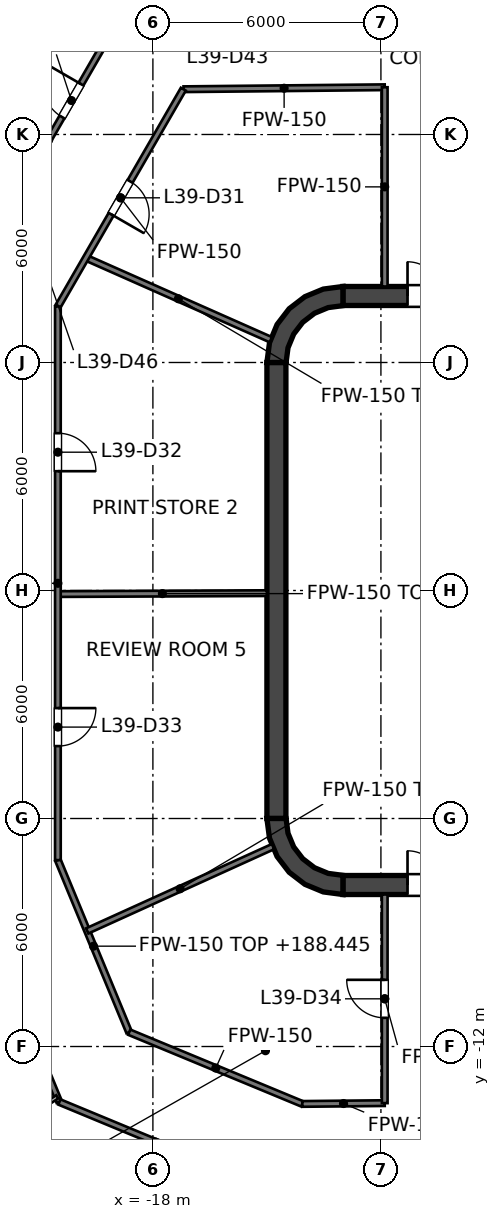
"""IFC4 building model, lengths in metres.
Left out: names, types, materials, properties, quantities, classifications, styles, units other than length and angle.
Written with IfcOpenShell. Run it as: python <this file> out.ifc"""

import sys

from ifc_helpers import new_model, si_unit, direction, frame, frame_2d, origin, place, context, subcontext, project, spatial, polyline, rectangle, outline, extrude, element, fill, save


model = new_model("IFC4")
c1 = context("Model", 3, precision=1e-05, world=origin(), true_north=direction((0.0, 1.0)))
c2 = subcontext(c1, "Body", "Model", "MODEL_VIEW")
j1 = project(units=[si_unit("LENGTHUNIT", "METRE"), si_unit("PLANEANGLEUNIT", "RADIAN")], contexts=[c1])
p1 = place(None, origin())
s1 = spatial("IfcSite", under=j1, at=p1, CompositionType="ELEMENT")
p2 = place(p1, origin())
s2 = spatial("IfcBuilding", under=s1, at=p2, CompositionType="ELEMENT")
p3 = place(p2, frame((0.0, 0.0, 185.6)))
s3 = spatial("IfcBuildingStorey", under=s2, at=p3, CompositionType="ELEMENT", Elevation=185.6)
p4 = place(p3, frame((-13.0, 7.75, 0.0), z_axis=(0.0, 0.0, 1.0), x_axis=(1.0, 0.0, 0.0)))
e1 = element("IfcWall", 1, at=p4, inside=s3, PredefinedType="SHEAR", context=c2, shape_type="SweptSolid", body=[
    extrude(rectangle(XDim=26.0, YDim=0.5, at=frame_2d((13.0, 0.0))), origin(), (0.0, 0.0, 1.0), 4.0),
])
p5 = place(p4, frame((1.7, 0.0, 0.0)))
e2 = element("IfcOpeningElement", 2, at=p5, cuts=e1, PredefinedType="OPENING", context=c2, shape_type="SweptSolid", body=[
    extrude(rectangle(XDim=1.8, YDim=2.1, at=frame_2d((0.9, 1.05))), frame((0.0, 0.25, 0.0), z_axis=(0.0, -1.0, 0.0), x_axis=(1.0, 0.0, 0.0)), (0.0, 0.0, 1.0), 0.5),
])
p6 = place(p4, frame((22.5, 0.0, 0.0)))
e3 = element("IfcOpeningElement", 3, at=p6, cuts=e1, PredefinedType="OPENING", context=c2, shape_type="SweptSolid", body=[
    extrude(rectangle(XDim=1.8, YDim=2.1, at=frame_2d((0.9, 1.05))), frame((0.0, 0.25, 0.0), z_axis=(0.0, -1.0, 0.0), x_axis=(1.0, 0.0, 0.0)), (0.0, 0.0, 1.0), 0.5),
])
p7 = place(p3, frame((-13.0, -7.75, 0.0), z_axis=(0.0, 0.0, 1.0), x_axis=(1.0, 0.0, 0.0)))
e4 = element("IfcWall", 4, at=p7, inside=s3, PredefinedType="SHEAR", context=c2, shape_type="SweptSolid", body=[
    extrude(rectangle(XDim=26.0, YDim=0.5, at=frame_2d((13.0, 0.0))), origin(), (0.0, 0.0, 1.0), 4.0),
])
p8 = place(p7, frame((1.7, 0.0, 0.0)))
e5 = element("IfcOpeningElement", 5, at=p8, cuts=e4, PredefinedType="OPENING", context=c2, shape_type="SweptSolid", body=[
    extrude(rectangle(XDim=1.8, YDim=2.1, at=frame_2d((0.9, 1.05))), frame((0.0, 0.25, 0.0), z_axis=(0.0, -1.0, 0.0), x_axis=(1.0, 0.0, 0.0)), (0.0, 0.0, 1.0), 0.5),
])
p9 = place(p7, frame((22.5, 0.0, 0.0)))
e6 = element("IfcOpeningElement", 6, at=p9, cuts=e4, PredefinedType="OPENING", context=c2, shape_type="SweptSolid", body=[
    extrude(rectangle(XDim=1.8, YDim=2.1, at=frame_2d((0.9, 1.05))), frame((0.0, 0.25, 0.0), z_axis=(0.0, -1.0, 0.0), x_axis=(1.0, 0.0, 0.0)), (0.0, 0.0, 1.0), 0.5),
])
p10 = place(p3, frame((-14.75, -6.0, 0.0), z_axis=(0.0, 0.0, 1.0), x_axis=(0.0, 1.0, 0.0)))
e7 = element("IfcWall", 7, at=p10, inside=s3, PredefinedType="SHEAR", context=c2, shape_type="SweptSolid", body=[
    extrude(rectangle(XDim=12.0, YDim=0.5, at=frame_2d((6.0, 0.0))), origin(), (0.0, 0.0, 1.0), 4.0),
])
p11 = place(p3, origin())
e8 = element("IfcWall", 8, at=p11, inside=s3, PredefinedType="SHEAR", context=c2, shape_type="SweptSolid", body=[
    extrude(outline(polyline([(-15.0, 6.0), (-14.496, 6.0), (-14.445, 6.387), (-14.295, 6.748), (-14.058, 7.058), (-13.748, 7.295), (-13.387, 7.445), (-13.0, 7.496), (-13.0, 8.0), (-13.518, 7.932), (-14.0, 7.732), (-14.414, 7.414), (-14.732, 7.0), (-14.932, 6.518), (-15.0, 6.0)])), origin(), (0.0, 0.0, 1.0), 4.0),
])
e9 = element("IfcWall", 9, at=p11, inside=s3, PredefinedType="SHEAR", context=c2, shape_type="SweptSolid", body=[
    extrude(outline(polyline([(-13.0, -8.0), (-13.0, -7.496), (-13.387, -7.445), (-13.748, -7.295), (-14.058, -7.058), (-14.295, -6.748), (-14.445, -6.387), (-14.496, -6.0), (-15.0, -6.0), (-14.932, -6.518), (-14.732, -7.0), (-14.414, -7.414), (-14.0, -7.732), (-13.518, -7.932), (-13.0, -8.0)])), origin(), (0.0, 0.0, 1.0), 4.0),
])
p12 = place(p3, frame((-11.8, -7.5, 0.0), z_axis=(0.0, 0.0, 1.0), x_axis=(0.0, 1.0, 0.0)))
e10 = element("IfcWall", 10, at=p12, inside=s3, PredefinedType="SOLIDWALL", context=c2, shape_type="SweptSolid", body=[
    extrude(rectangle(XDim=15.0, YDim=0.4, at=frame_2d((7.5, 0.0))), origin(), (0.0, 0.0, 1.0), 3.85),
])
p13 = place(p12, frame((11.3, 0.0, 0.0)))
e11 = element("IfcOpeningElement", 11, at=p13, cuts=e10, PredefinedType="OPENING", context=c2, shape_type="SweptSolid", body=[
    extrude(rectangle(XDim=1.1, YDim=2.1, at=frame_2d((0.55, 1.05))), frame((0.0, 0.2, 0.0), z_axis=(0.0, -1.0, 0.0), x_axis=(1.0, 0.0, 0.0)), (0.0, 0.0, 1.0), 0.4),
])
p14 = place(p12, frame((8.4, 0.0, 0.0)))
e12 = element("IfcOpeningElement", 12, at=p14, cuts=e10, PredefinedType="OPENING", context=c2, shape_type="SweptSolid", body=[
    extrude(rectangle(XDim=1.1, YDim=2.1, at=frame_2d((0.55, 1.05))), frame((0.0, 0.2, 0.0), z_axis=(0.0, -1.0, 0.0), x_axis=(1.0, 0.0, 0.0)), (0.0, 0.0, 1.0), 0.4),
])
p15 = place(p12, frame((5.5, 0.0, 0.0)))
e13 = element("IfcOpeningElement", 13, at=p15, cuts=e10, PredefinedType="OPENING", context=c2, shape_type="SweptSolid", body=[
    extrude(rectangle(XDim=1.1, YDim=2.1, at=frame_2d((0.55, 1.05))), frame((0.0, 0.2, 0.0), z_axis=(0.0, -1.0, 0.0), x_axis=(1.0, 0.0, 0.0)), (0.0, 0.0, 1.0), 0.4),
])
p16 = place(p12, frame((13.697, 0.0, 0.0)))
e14 = element("IfcOpeningElement", 14, at=p16, cuts=e10, PredefinedType="OPENING", context=c2, shape_type="SweptSolid", body=[
    extrude(rectangle(XDim=0.9, YDim=2.1, at=frame_2d((0.45, 1.05))), frame((0.0, 0.2, 0.0), z_axis=(0.0, -1.0, 0.0), x_axis=(1.0, 0.0, 0.0)), (0.0, 0.0, 1.0), 0.4),
])
p17 = place(p12, frame((0.403, 0.0, 0.0)))
e15 = element("IfcOpeningElement", 15, at=p17, cuts=e10, PredefinedType="OPENING", context=c2, shape_type="SweptSolid", body=[
    extrude(rectangle(XDim=0.9, YDim=2.1, at=frame_2d((0.45, 1.05))), frame((0.0, 0.2, 0.0), z_axis=(0.0, -1.0, 0.0), x_axis=(1.0, 0.0, 0.0)), (0.0, 0.0, 1.0), 0.4),
])
e16 = element("IfcWall", 16, at=p11, inside=s3, PredefinedType="SOLIDWALL", context=c2, shape_type="SweptSolid", body=[
    extrude(outline(polyline([(-12.0, -5.925), (-12.0, -5.675), (-14.25, -5.675), (-14.25, -3.025), (-12.0, -3.025), (-12.0, -2.775), (-14.25, -2.775), (-14.25, -0.125), (-12.0, -0.125), (-12.0, 0.125), (-14.25, 0.125), (-14.25, 2.775), (-12.0, 2.775), (-12.0, 3.025), (-14.25, 3.025), (-14.25, 5.675), (-12.0, 5.675), (-12.0, 5.925), (-14.25, 5.925), (-14.5, 5.925), (-14.5, 5.675), (-14.5, 3.025), (-14.5, 2.775), (-14.5, 0.125), (-14.5, -0.125), (-14.5, -2.775), (-14.5, -3.025), (-14.5, -5.675), (-14.5, -5.925), (-14.25, -5.925), (-12.0, -5.925)])), origin(), (0.0, 0.0, 1.0), 3.85),
])
p18 = place(p3, frame((-22.9, -7.572, 0.0), z_axis=(0.0, 0.0, 1.0), x_axis=(0.382367581622, -0.924010298928, 0.0)))
e17 = element("IfcWall", 17, at=p18, inside=s3, PredefinedType="PARTITIONING", context=c2, shape_type="SweptSolid", body=[
    extrude(rectangle(XDim=6.374, YDim=0.15, at=frame_2d((3.187, 0.0))), origin(), (0.0, 0.0, 1.0), 2.777),
])
p19 = place(p18, frame((2.6, 0.0, 0.0)))
e18 = element("IfcOpeningElement", 18, at=p19, cuts=e17, PredefinedType="OPENING", context=c2, shape_type="SweptSolid", body=[
    extrude(rectangle(XDim=1.0, YDim=2.1, at=frame_2d((0.5, 1.05))), frame((0.0, 0.075, 0.0), z_axis=(0.0, -1.0, 0.0), x_axis=(1.0, 0.0, 0.0)), (0.0, 0.0, 1.0), 0.15),
])
p20 = place(p3, frame((-20.5, -7.095, 0.0), z_axis=(0.0, 0.0, 1.0), x_axis=(0.382364990163, -0.924011371303, 0.0)))
e19 = element("IfcWall", 19, at=p20, inside=s3, PredefinedType="PARTITIONING", context=c2, shape_type="SweptSolid", body=[
    extrude(rectangle(XDim=4.902, YDim=0.15, at=frame_2d((2.451, 0.0))), origin(), (0.0, 0.0, 1.0), 2.845),
])
p21 = place(p3, frame((-24.433, 14.106, 0.0), z_axis=(0.0, 0.0, 1.0), x_axis=(0.866048255864, -0.499960416948, 0.0)))
e20 = element("IfcWall", 20, at=p21, inside=s3, PredefinedType="PARTITIONING", context=c2, shape_type="SweptSolid", body=[
    extrude(rectangle(XDim=4.322, YDim=0.15, at=frame_2d((2.161, 0.0))), origin(), (0.0, 0.0, 1.0), 2.845),
])
p22 = place(p3, frame((-19.76, 8.755, 0.0), z_axis=(0.0, 0.0, 1.0), x_axis=(0.91424834547, -0.405154245695, 0.0)))
e21 = element("IfcWall", 21, at=p22, inside=s3, PredefinedType="PARTITIONING", context=c2, shape_type="SweptSolid", body=[
    extrude(rectangle(XDim=5.318, YDim=0.15, at=frame_2d((2.659, 0.0))), origin(), (0.0, 0.0, 1.0), 2.845),
])
p23 = place(p3, frame((-20.46, -13.46, 0.0), z_axis=(0.0, 0.0, 1.0), x_axis=(0.923801547606, -0.382871650349, 0.0)))
e22 = element("IfcWall", 22, at=p23, inside=s3, PredefinedType="PARTITIONING", context=c2, shape_type="SweptSolid", body=[
    extrude(rectangle(XDim=6.415, YDim=0.15, at=frame_2d((3.208, 0.0))), origin(), (0.0, 0.0, 1.0), 2.777),
])
p24 = place(p23, frame((2.707, 0.0, 0.0)))
e23 = element("IfcOpeningElement", 23, at=p24, cuts=e22, PredefinedType="OPENING", context=c2, shape_type="SweptSolid", body=[
    extrude(rectangle(XDim=1.0, YDim=2.1, at=frame_2d((0.5, 1.05))), frame((0.0, 0.075, 0.0), z_axis=(0.0, -1.0, 0.0), x_axis=(1.0, 0.0, 0.0)), (0.0, 0.0, 1.0), 0.15),
])
p25 = place(p3, frame((-18.623, -11.623, 0.0), z_axis=(0.0, 0.0, 1.0), x_axis=(0.923791670587, -0.38289548098, 0.0)))
e24 = element("IfcWall", 24, at=p25, inside=s3, PredefinedType="PARTITIONING", context=c2, shape_type="SweptSolid", body=[
    extrude(rectangle(XDim=4.931, YDim=0.15, at=frame_2d((2.465, 0.0))), origin(), (0.0, 0.0, 1.0), 2.777),
])
p26 = place(p3, frame((-20.5, -0.094, 0.0), z_axis=(0.0, 0.0, 1.0), x_axis=(0.999990148138, 0.004438876723, 0.0)))
e25 = element("IfcWall", 25, at=p26, inside=s3, PredefinedType="PARTITIONING", context=c2, shape_type="SweptSolid", body=[
    extrude(rectangle(XDim=5.5, YDim=0.15, at=frame_2d((2.75, 0.0))), origin(), (0.0, 0.0, 1.0), 2.768),
])
p27 = place(p3, frame((-14.068, -13.511, 0.0), z_axis=(0.0, 0.0, 1.0), x_axis=(0.999950911515, 0.009908307647, 0.0)))
e26 = element("IfcWall", 26, at=p27, inside=s3, PredefinedType="PARTITIONING", context=c2, shape_type="SweptSolid", body=[
    extrude(rectangle(XDim=2.168, YDim=0.15, at=frame_2d((1.084, 0.0))), origin(), (0.0, 0.0, 1.0), 2.777),
])
p28 = place(p3, frame((-17.194, 13.191, 0.0), z_axis=(0.0, 0.0, 1.0), x_axis=(0.999950853109, 0.009914200296, 0.0)))
e27 = element("IfcWall", 27, at=p28, inside=s3, PredefinedType="PARTITIONING", context=c2, shape_type="SweptSolid", body=[
    extrude(rectangle(XDim=5.294, YDim=0.15, at=frame_2d((2.647, 0.0))), origin(), (0.0, 0.0, 1.0), 2.777),
])
p29 = place(p3, frame((-19.728, -8.958, 0.0), z_axis=(0.0, 0.0, 1.0), x_axis=(0.910629511797, 0.413223779863, 0.0)))
e28 = element("IfcWall", 28, at=p29, inside=s3, PredefinedType="PARTITIONING", context=c2, shape_type="SweptSolid", body=[
    extrude(rectangle(XDim=5.368, YDim=0.15, at=frame_2d((2.684, 0.0))), origin(), (0.0, 0.0, 1.0), 3.7),
])
p30 = place(p3, frame((-20.5, 7.474, 0.0), z_axis=(0.0, 0.0, 1.0), x_axis=(0.499957196903, 0.866050114754, 0.0)))
e29 = element("IfcWall", 29, at=p30, inside=s3, PredefinedType="PARTITIONING", context=c2, shape_type="SweptSolid", body=[
    extrude(rectangle(XDim=6.602, YDim=0.15, at=frame_2d((3.301, 0.0))), origin(), (0.0, 0.0, 1.0), 2.777),
])
p31 = place(p30, frame((2.802, 0.0, 0.0)))
e30 = element("IfcOpeningElement", 30, at=p31, cuts=e29, PredefinedType="OPENING", context=c2, shape_type="SweptSolid", body=[
    extrude(rectangle(XDim=1.0, YDim=2.1, at=frame_2d((0.5, 1.05))), frame((0.0, 0.075, 0.0), z_axis=(0.0, -1.0, 0.0), x_axis=(1.0, 0.0, 0.0)), (0.0, 0.0, 1.0), 0.15),
])
p32 = place(p3, frame((-22.9, 8.117, 0.0), z_axis=(0.0, 0.0, 1.0), x_axis=(0.499950307977, 0.866054091587, 0.0)))
e31 = element("IfcWall", 31, at=p32, inside=s3, PredefinedType="PARTITIONING", context=c2, shape_type="SweptSolid", body=[
    extrude(rectangle(XDim=8.626, YDim=0.15, at=frame_2d((4.313, 0.0))), origin(), (0.0, 0.0, 1.0), 2.777),
])
p33 = place(p32, frame((5.015, 0.0, 0.0)))
e32 = element("IfcOpeningElement", 32, at=p33, cuts=e31, PredefinedType="OPENING", context=c2, shape_type="SweptSolid", body=[
    extrude(rectangle(XDim=1.0, YDim=2.1, at=frame_2d((0.5, 1.05))), frame((0.0, 0.075, 0.0), z_axis=(0.0, -1.0, 0.0), x_axis=(1.0, 0.0, 0.0)), (0.0, 0.0, 1.0), 0.15),
])
p34 = place(p32, frame((2.237, 0.0, 0.0)))
e33 = element("IfcOpeningElement", 33, at=p34, cuts=e31, PredefinedType="OPENING", context=c2, shape_type="SweptSolid", body=[
    extrude(rectangle(XDim=1.0, YDim=2.1, at=frame_2d((0.5, 1.05))), frame((0.0, 0.075, 0.0), z_axis=(0.0, -1.0, 0.0), x_axis=(1.0, 0.0, 0.0)), (0.0, 0.0, 1.0), 0.15),
])
p35 = place(p3, frame((-11.9, -13.49, 0.0), z_axis=(0.0, 0.0, 1.0), x_axis=(0.0, 1.0, 0.0)))
e34 = element("IfcWall", 34, at=p35, inside=s3, PredefinedType="PARTITIONING", context=c2, shape_type="SweptSolid", body=[
    extrude(rectangle(XDim=5.49, YDim=0.15, at=frame_2d((2.745, 0.0))), origin(), (0.0, 0.0, 1.0), 2.777),
])
p36 = place(p35, frame((2.245, 0.0, 0.0)))
e35 = element("IfcOpeningElement", 35, at=p36, cuts=e34, PredefinedType="OPENING", context=c2, shape_type="SweptSolid", body=[
    extrude(rectangle(XDim=1.0, YDim=2.1, at=frame_2d((0.5, 1.05))), frame((0.0, 0.075, 0.0), z_axis=(0.0, -1.0, 0.0), x_axis=(1.0, 0.0, 0.0)), (0.0, 0.0, 1.0), 0.15),
])
p37 = place(p3, frame((-11.9, 8.0, 0.0), z_axis=(0.0, 0.0, 1.0), x_axis=(0.0, 1.0, 0.0)))
e36 = element("IfcWall", 36, at=p37, inside=s3, PredefinedType="PARTITIONING", context=c2, shape_type="SweptSolid", body=[
    extrude(rectangle(XDim=5.243, YDim=0.15, at=frame_2d((2.622, 0.0))), origin(), (0.0, 0.0, 1.0), 2.777),
])
p38 = place(p3, frame((-20.5, -7.095, 0.0), z_axis=(0.0, 0.0, 1.0), x_axis=(0.0, 1.0, 0.0)))
e37 = element("IfcWall", 37, at=p38, inside=s3, PredefinedType="PARTITIONING", context=c2, shape_type="SweptSolid", body=[
    extrude(rectangle(XDim=14.569, YDim=0.15, at=frame_2d((7.285, 0.0))), origin(), (0.0, 0.0, 1.0), 2.768),
])
p39 = place(p38, frame((10.234, 0.0, 0.0)))
e38 = element("IfcOpeningElement", 38, at=p39, cuts=e37, PredefinedType="OPENING", context=c2, shape_type="SweptSolid", body=[
    extrude(rectangle(XDim=1.0, YDim=2.1, at=frame_2d((0.5, 1.05))), frame((0.0, 0.075, 0.0), z_axis=(0.0, -1.0, 0.0), x_axis=(1.0, 0.0, 0.0)), (0.0, 0.0, 1.0), 0.15),
])
p40 = place(p38, frame((3.0, 0.0, 0.0)))
e39 = element("IfcOpeningElement", 39, at=p40, cuts=e37, PredefinedType="OPENING", context=c2, shape_type="SweptSolid", body=[
    extrude(rectangle(XDim=1.0, YDim=2.1, at=frame_2d((0.5, 1.05))), frame((0.0, 0.075, 0.0), z_axis=(0.0, -1.0, 0.0), x_axis=(1.0, 0.0, 0.0)), (0.0, 0.0, 1.0), 0.15),
])
p41 = place(p3, frame((-23.271, -15.113, 0.0), z_axis=(0.0, 0.0, 1.0), x_axis=(0.83866769183, 0.544643463819, 0.0)))
e40 = element("IfcWall", 40, at=p41, inside=s3, PredefinedType="PARTITIONING", context=c2, shape_type="SweptSolid", body=[
    extrude(rectangle(XDim=3.285, YDim=0.1, at=frame_2d((1.643, 0.0))), origin(), (0.0, 0.0, 1.0), 3.273),
])
p42 = place(p13, origin())
e41 = element("IfcDoor", 41, at=p42, inside=s3, OperationType="DOUBLE_DOOR_SLIDING", PredefinedType="DOOR", context=c2, shape_type="SweptSolid", body=[
    extrude(rectangle(XDim=1.1, YDim=2.1, at=frame_2d((0.55, 1.05))), frame((0.0, 0.025, 0.0), z_axis=(0.0, -1.0, 0.0), x_axis=(1.0, 0.0, 0.0)), (0.0, 0.0, 1.0), 0.05),
])
fill(e11, e41)
p43 = place(p14, origin())
e42 = element("IfcDoor", 42, at=p43, inside=s3, OperationType="DOUBLE_DOOR_SLIDING", PredefinedType="DOOR", context=c2, shape_type="SweptSolid", body=[
    extrude(rectangle(XDim=1.1, YDim=2.1, at=frame_2d((0.55, 1.05))), frame((0.0, 0.025, 0.0), z_axis=(0.0, -1.0, 0.0), x_axis=(1.0, 0.0, 0.0)), (0.0, 0.0, 1.0), 0.05),
])
fill(e12, e42)
p44 = place(p15, origin())
e43 = element("IfcDoor", 43, at=p44, inside=s3, OperationType="DOUBLE_DOOR_SLIDING", PredefinedType="DOOR", context=c2, shape_type="SweptSolid", body=[
    extrude(rectangle(XDim=1.1, YDim=2.1, at=frame_2d((0.55, 1.05))), frame((0.0, 0.025, 0.0), z_axis=(0.0, -1.0, 0.0), x_axis=(1.0, 0.0, 0.0)), (0.0, 0.0, 1.0), 0.05),
])
fill(e13, e43)
p45 = place(p16, origin())
e44 = element("IfcDoor", 44, at=p45, inside=s3, OperationType="SINGLE_SWING_LEFT", PredefinedType="DOOR", context=c2, shape_type="SweptSolid", body=[
    extrude(rectangle(XDim=0.9, YDim=2.1, at=frame_2d((0.45, 1.05))), frame((0.0, 0.025, 0.0), z_axis=(0.0, -1.0, 0.0), x_axis=(1.0, 0.0, 0.0)), (0.0, 0.0, 1.0), 0.05),
])
fill(e14, e44)
p46 = place(p17, origin())
e45 = element("IfcDoor", 45, at=p46, inside=s3, OperationType="SINGLE_SWING_LEFT", PredefinedType="DOOR", context=c2, shape_type="SweptSolid", body=[
    extrude(rectangle(XDim=0.9, YDim=2.1, at=frame_2d((0.45, 1.05))), frame((0.0, 0.025, 0.0), z_axis=(0.0, -1.0, 0.0), x_axis=(1.0, 0.0, 0.0)), (0.0, 0.0, 1.0), 0.05),
])
fill(e15, e45)
p47 = place(p5, origin())
e46 = element("IfcDoor", 46, at=p47, inside=s3, OperationType="DOUBLE_DOOR_SINGLE_SWING", PredefinedType="DOOR", context=c2, shape_type="SweptSolid", body=[
    extrude(rectangle(XDim=1.8, YDim=2.1, at=frame_2d((0.9, 1.05))), frame((0.0, 0.025, 0.0), z_axis=(0.0, -1.0, 0.0), x_axis=(1.0, 0.0, 0.0)), (0.0, 0.0, 1.0), 0.05),
])
fill(e2, e46)
p48 = place(p8, origin())
e47 = element("IfcDoor", 47, at=p48, inside=s3, OperationType="DOUBLE_DOOR_SINGLE_SWING", PredefinedType="DOOR", context=c2, shape_type="SweptSolid", body=[
    extrude(rectangle(XDim=1.8, YDim=2.1, at=frame_2d((0.9, 1.05))), frame((0.0, 0.025, 0.0), z_axis=(0.0, -1.0, 0.0), x_axis=(1.0, 0.0, 0.0)), (0.0, 0.0, 1.0), 0.05),
])
fill(e5, e47)
p49 = place(p31, origin())
e48 = element("IfcDoor", 48, at=p49, inside=s3, OperationType="SINGLE_SWING_LEFT", PredefinedType="DOOR", context=c2, shape_type="SweptSolid", body=[
    extrude(rectangle(XDim=1.0, YDim=2.1, at=frame_2d((0.5, 1.05))), frame((0.0, 0.025, 0.0), z_axis=(0.0, -1.0, 0.0), x_axis=(1.0, 0.0, 0.0)), (0.0, 0.0, 1.0), 0.05),
])
fill(e30, e48)
p50 = place(p39, origin())
e49 = element("IfcDoor", 49, at=p50, inside=s3, OperationType="SINGLE_SWING_LEFT", PredefinedType="DOOR", context=c2, shape_type="SweptSolid", body=[
    extrude(rectangle(XDim=1.0, YDim=2.1, at=frame_2d((0.5, 1.05))), frame((0.0, 0.025, 0.0), z_axis=(0.0, -1.0, 0.0), x_axis=(1.0, 0.0, 0.0)), (0.0, 0.0, 1.0), 0.05),
])
fill(e38, e49)
p51 = place(p40, origin())
e50 = element("IfcDoor", 50, at=p51, inside=s3, OperationType="SINGLE_SWING_RIGHT", PredefinedType="DOOR", context=c2, shape_type="SweptSolid", body=[
    extrude(rectangle(XDim=1.0, YDim=2.1, at=frame_2d((0.5, 1.05))), frame((0.0, 0.025, 0.0), z_axis=(0.0, -1.0, 0.0), x_axis=(1.0, 0.0, 0.0)), (0.0, 0.0, 1.0), 0.05),
])
fill(e39, e50)
p52 = place(p36, origin())
e51 = element("IfcDoor", 51, at=p52, inside=s3, OperationType="SINGLE_SWING_RIGHT", PredefinedType="DOOR", context=c2, shape_type="SweptSolid", body=[
    extrude(rectangle(XDim=1.0, YDim=2.1, at=frame_2d((0.5, 1.05))), frame((0.0, 0.025, 0.0), z_axis=(0.0, -1.0, 0.0), x_axis=(1.0, 0.0, 0.0)), (0.0, 0.0, 1.0), 0.05),
])
fill(e35, e51)
p53 = place(p33, origin())
e52 = element("IfcDoor", 52, at=p53, inside=s3, OperationType="SINGLE_SWING_RIGHT", PredefinedType="DOOR", context=c2, shape_type="SweptSolid", body=[
    extrude(rectangle(XDim=1.0, YDim=2.1, at=frame_2d((0.5, 1.05))), frame((0.0, 0.025, 0.0), z_axis=(0.0, -1.0, 0.0), x_axis=(1.0, 0.0, 0.0)), (0.0, 0.0, 1.0), 0.05),
])
fill(e32, e52)
save(model, sys.argv[1])
